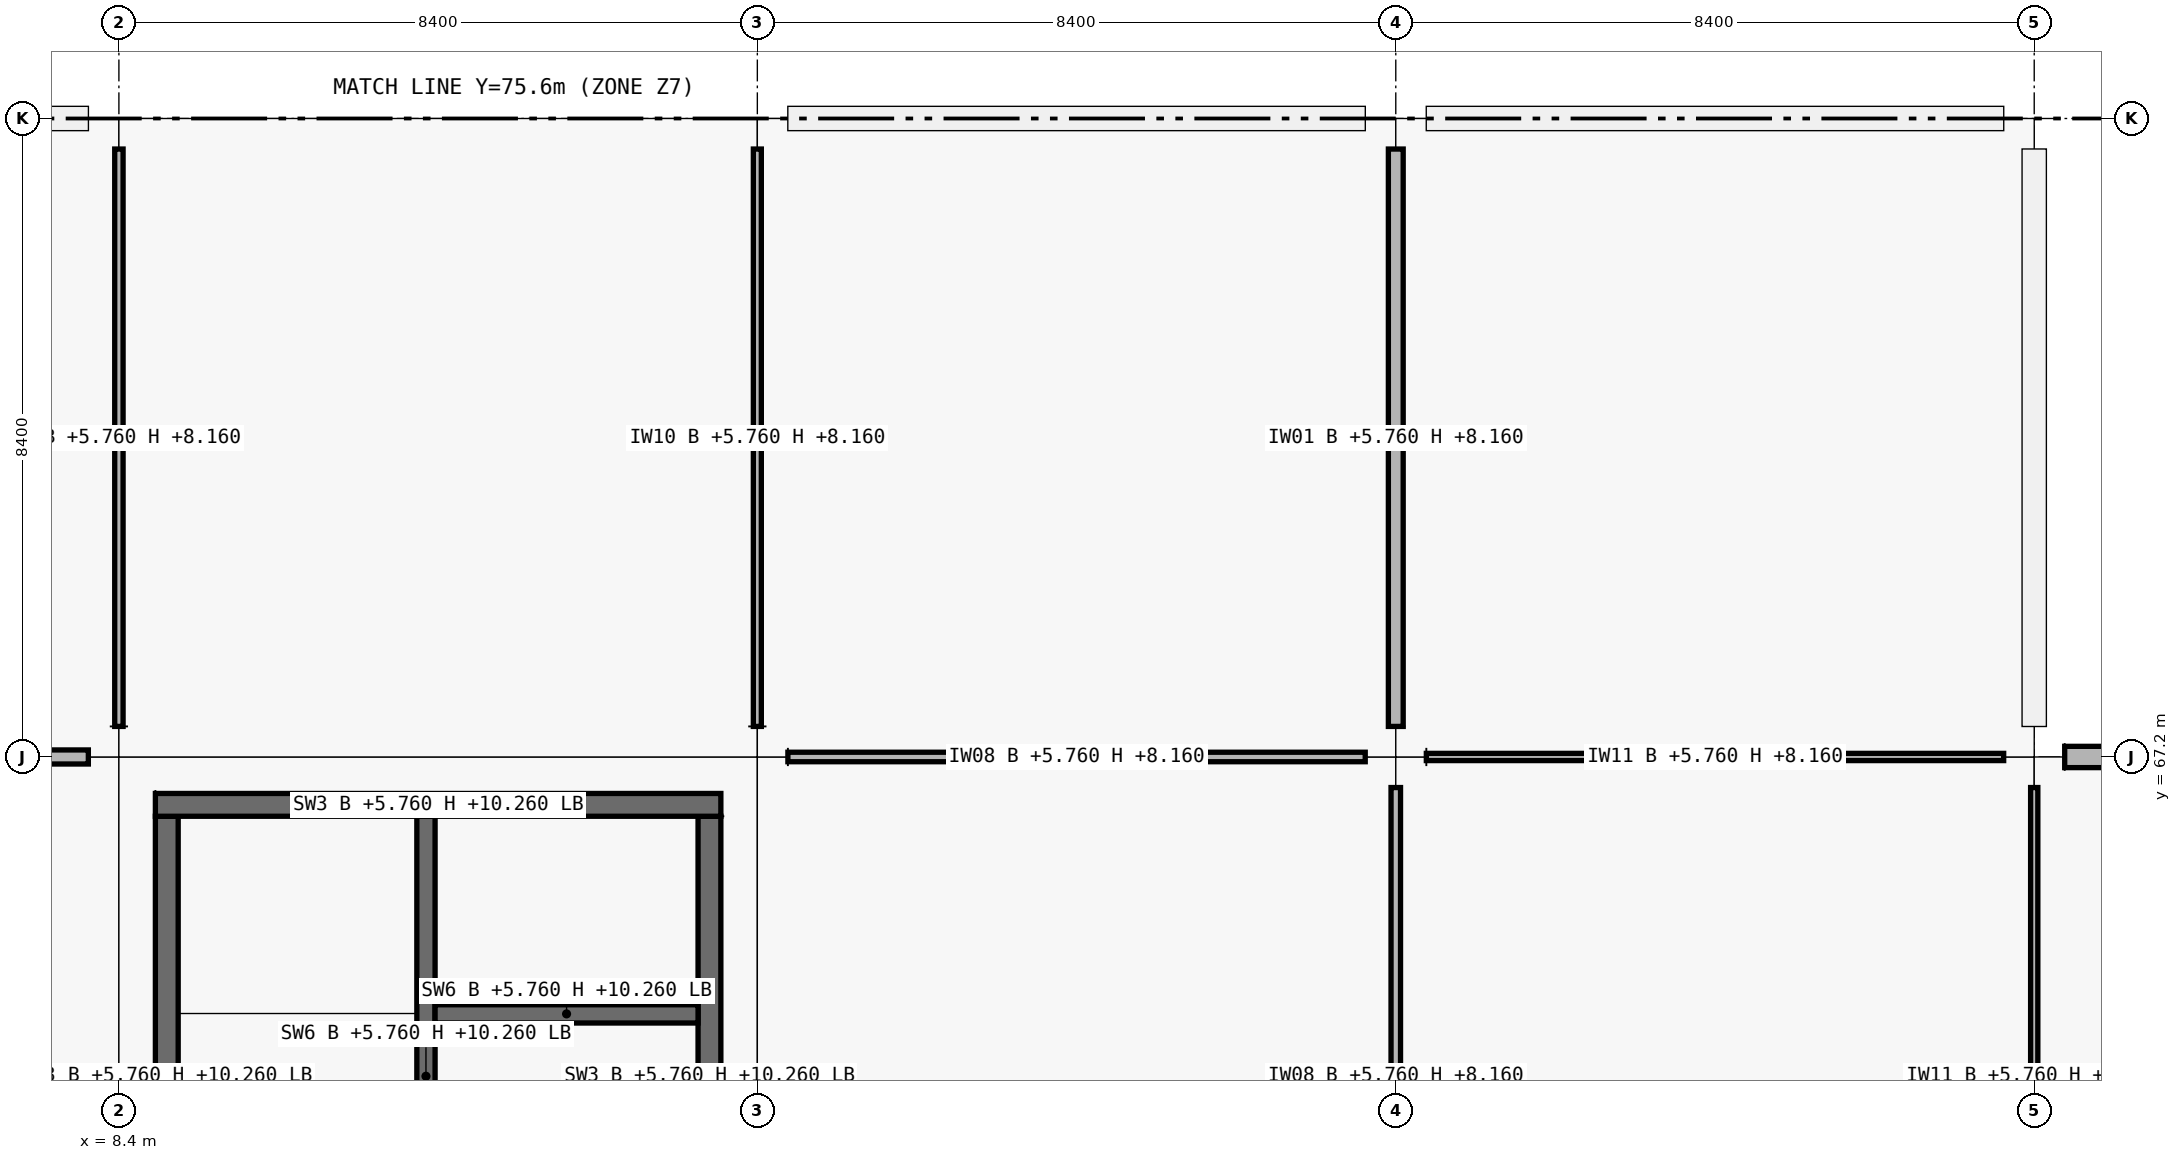
"""IFC4 building model, lengths in metres.
Left out: names, types, materials, properties, quantities, classifications, styles, units other than length and angle.
Written with IfcOpenShell. Run it as: python <this file> out.ifc"""

import sys

from ifc_helpers import new_model, si_unit, direction, frame, frame_2d, origin, origin_2d, place, context, subcontext, project, spatial, rectangle, extrude, element, fill, save


model = new_model("IFC4")
c1 = context("Model", 3, precision=1e-05, world=origin(), true_north=direction((0.0, 1.0)))
c2 = subcontext(c1, "Body", "Model", "MODEL_VIEW")
j1 = project(units=[si_unit("LENGTHUNIT", "METRE"), si_unit("PLANEANGLEUNIT", "RADIAN")], contexts=[c1])
p1 = place(None, origin())
s1 = spatial("IfcSite", under=j1, at=p1, CompositionType="ELEMENT")
p2 = place(p1, origin())
s2 = spatial("IfcBuilding", under=s1, at=p2, CompositionType="ELEMENT")
p3 = place(p2, frame((0.0, 0.0, 5.76)))
s3 = spatial("IfcBuildingStorey", under=s2, at=p3, CompositionType="ELEMENT", Elevation=5.76)
for number, where, z_axis, x_axis in (
    (1, (8.4, 67.2, 0.0), (0.0, 0.0, 1.0), (1.0, 0.0, 0.0)),
    (2, (8.4, 75.6, 0.0), (0.0, 0.0, 1.0), (1.0, 0.0, 0.0)),
    (3, (16.8, 67.2, 0.0), (0.0, 0.0, 1.0), (1.0, 0.0, 0.0)),
    (4, (16.8, 75.6, 0.0), (0.0, 0.0, 1.0), (1.0, 0.0, 0.0)),
    (5, (25.2, 67.2, 0.0), (0.0, 0.0, 1.0), (1.0, 0.0, 0.0)),
    (6, (25.2, 75.6, 0.0), (0.0, 0.0, 1.0), (1.0, 0.0, 0.0)),
    (7, (33.6, 67.2, 0.0), (0.0, 0.0, 1.0), (1.0, 0.0, 0.0)),
    (8, (33.6, 75.6, 0.0), (0.0, 0.0, 1.0), (1.0, 0.0, 0.0)),
):
    element("IfcColumn", number, at=place(p3, frame(where, z_axis=z_axis, x_axis=x_axis)), inside=s3, PredefinedType="COLUMN", context=c2, shape_type="SweptSolid", body=[
        extrude(rectangle(XDim=0.8, YDim=0.8, at=origin_2d()), origin(), (0.0, 0.0, 1.0), 4.5),
    ])
p4 = place(p3, frame((0.276, 75.6, 0.0), z_axis=(0.0, 0.0, 1.0), x_axis=(1.0, 0.0, 0.0)))
e9 = element("IfcWall", 9, at=p4, inside=s3, PredefinedType="SOLIDWALL", context=c2, shape_type="SweptSolid", body=[
    extrude(rectangle(XDim=7.723, YDim=0.32, at=frame_2d((3.862, 0.0))), origin(), (0.0, 0.0, 1.0), 3.4),
])
p5 = place(p4, frame((2.861, 0.0, 0.9)))
e10 = element("IfcOpeningElement", 10, at=p5, cuts=e9, PredefinedType="OPENING", context=c2, shape_type="SweptSolid", body=[
    extrude(rectangle(XDim=2.0, YDim=2.25, at=frame_2d((1.0, 1.125))), frame((0.0, 0.16, 0.0), z_axis=(0.0, -1.0, 0.0), x_axis=(1.0, 0.0, 0.0)), (0.0, 0.0, 1.0), 0.32),
])
p6 = place(p3, frame((17.201, 75.6, 0.0), z_axis=(0.0, 0.0, 1.0), x_axis=(1.0, 0.0, 0.0)))
e11 = element("IfcWall", 11, at=p6, inside=s3, PredefinedType="SOLIDWALL", context=c2, shape_type="SweptSolid", body=[
    extrude(rectangle(XDim=7.598, YDim=0.32, at=frame_2d((3.799, 0.0))), origin(), (0.0, 0.0, 1.0), 3.4),
])
p7 = place(p6, frame((3.049, 0.0, 0.9)))
e12 = element("IfcOpeningElement", 12, at=p7, cuts=e11, PredefinedType="OPENING", context=c2, shape_type="SweptSolid", body=[
    extrude(rectangle(XDim=1.5, YDim=1.2, at=frame_2d((0.75, 0.6))), frame((0.0, 0.16, 0.0), z_axis=(0.0, -1.0, 0.0), x_axis=(1.0, 0.0, 0.0)), (0.0, 0.0, 1.0), 0.32),
])
p8 = place(p3, frame((25.601, 75.6, 0.0), z_axis=(0.0, 0.0, 1.0), x_axis=(1.0, 0.0, 0.0)))
e13 = element("IfcWall", 13, at=p8, inside=s3, PredefinedType="SOLIDWALL", context=c2, shape_type="SweptSolid", body=[
    extrude(rectangle(XDim=7.598, YDim=0.32, at=frame_2d((3.799, 0.0))), origin(), (0.0, 0.0, 1.0), 3.4),
])
p9 = place(p8, frame((2.724, 0.0, 0.9)))
e14 = element("IfcOpeningElement", 14, at=p9, cuts=e13, PredefinedType="OPENING", context=c2, shape_type="SweptSolid", body=[
    extrude(rectangle(XDim=2.15, YDim=1.95, at=frame_2d((1.075, 0.975))), frame((0.0, 0.16, 0.0), z_axis=(0.0, -1.0, 0.0), x_axis=(1.0, 0.0, 0.0)), (0.0, 0.0, 1.0), 0.32),
])
p10 = place(p3, frame((33.6, 75.199, 0.0), z_axis=(0.0, 0.0, 1.0), x_axis=(0.0, -1.0, 0.0)))
e15 = element("IfcWall", 15, at=p10, inside=s3, PredefinedType="SOLIDWALL", context=c2, shape_type="SweptSolid", body=[
    extrude(rectangle(XDim=7.598, YDim=0.32, at=frame_2d((3.799, 0.0))), origin(), (0.0, 0.0, 1.0), 3.4),
])
p11 = place(p10, frame((2.524, 0.0, 0.9)))
e16 = element("IfcOpeningElement", 16, at=p11, cuts=e15, PredefinedType="OPENING", context=c2, shape_type="SweptSolid", body=[
    extrude(rectangle(XDim=2.55, YDim=1.95, at=frame_2d((1.275, 0.975))), frame((0.0, 0.16, 0.0), z_axis=(0.0, -1.0, 0.0), x_axis=(1.0, 0.0, 0.0)), (0.0, 0.0, 1.0), 0.32),
])
p12 = place(p3, frame((34.001, 67.2, 0.0), z_axis=(0.0, 0.0, 1.0), x_axis=(1.0, 0.0, 0.0)))
e17 = element("IfcWall", 17, at=p12, inside=s3, PredefinedType="SOLIDWALL", context=c2, shape_type="SweptSolid", body=[
    extrude(rectangle(XDim=7.598, YDim=0.28, at=frame_2d((3.799, 0.0))), origin(), (0.0, 0.0, 1.0), 3.4),
])
p13 = place(p12, frame((3.149, 0.0, 0.9)))
e18 = element("IfcOpeningElement", 18, at=p13, cuts=e17, PredefinedType="OPENING", context=c2, shape_type="SweptSolid", body=[
    extrude(rectangle(XDim=1.3, YDim=1.95, at=frame_2d((0.65, 0.975))), frame((0.0, 0.14, 0.0), z_axis=(0.0, -1.0, 0.0), x_axis=(1.0, 0.0, 0.0)), (0.0, 0.0, 1.0), 0.28),
])
p14 = place(p3, frame((9.03, 59.58, 0.0), z_axis=(0.0, 0.0, 1.0), x_axis=(0.0, 1.0, 0.0)))
e19 = element("IfcWall", 19, at=p14, inside=s3, PredefinedType="SHEAR", context=c2, shape_type="SweptSolid", body=[
    extrude(rectangle(XDim=6.84, YDim=0.3, at=frame_2d((3.42, 0.0))), origin(), (0.0, 0.0, 1.0), 4.5),
])
p15 = place(p3, frame((8.88, 66.57, 0.0), z_axis=(0.0, 0.0, 1.0), x_axis=(1.0, 0.0, 0.0)))
e20 = element("IfcWall", 20, at=p15, inside=s3, PredefinedType="SHEAR", context=c2, shape_type="SweptSolid", body=[
    extrude(rectangle(XDim=7.44, YDim=0.3, at=frame_2d((3.72, 0.0))), origin(), (0.0, 0.0, 1.0), 4.5),
])
p16 = place(p3, frame((16.17, 66.42, 0.0), z_axis=(0.0, 0.0, 1.0), x_axis=(0.0, -1.0, 0.0)))
e21 = element("IfcWall", 21, at=p16, inside=s3, PredefinedType="SHEAR", context=c2, shape_type="SweptSolid", body=[
    extrude(rectangle(XDim=6.84, YDim=0.3, at=frame_2d((3.42, 0.0))), origin(), (0.0, 0.0, 1.0), 4.5),
])
p17 = place(p3, frame((12.44, 59.58, 0.0), z_axis=(0.0, 0.0, 1.0), x_axis=(0.0, 1.0, 0.0)))
e22 = element("IfcWall", 22, at=p17, inside=s3, PredefinedType="SHEAR", context=c2, shape_type="SweptSolid", body=[
    extrude(rectangle(XDim=6.84, YDim=0.24, at=frame_2d((3.42, 0.0))), origin(), (0.0, 0.0, 1.0), 4.5),
])
p18 = place(p17, frame((0.12, 0.0, 0.0)))
e23 = element("IfcOpeningElement", 23, at=p18, cuts=e22, PredefinedType="OPENING", context=c2, shape_type="SweptSolid", body=[
    extrude(rectangle(XDim=1.0, YDim=2.15, at=frame_2d((0.5, 1.075))), frame((0.0, 0.12, 0.0), z_axis=(0.0, -1.0, 0.0), x_axis=(1.0, 0.0, 0.0)), (0.0, 0.0, 1.0), 0.24),
])
p19 = place(p3, frame((12.56, 63.82, 0.0), z_axis=(0.0, 0.0, 1.0), x_axis=(1.0, 0.0, 0.0)))
e24 = element("IfcWall", 24, at=p19, inside=s3, PredefinedType="SHEAR", context=c2, shape_type="SweptSolid", body=[
    extrude(rectangle(XDim=3.46, YDim=0.24, at=frame_2d((1.73, 0.0))), origin(), (0.0, 0.0, 1.0), 4.5),
])
p20 = place(p19, frame((1.18, 0.0, 0.0)))
e25 = element("IfcOpeningElement", 25, at=p20, cuts=e24, PredefinedType="OPENING", context=c2, shape_type="SweptSolid", body=[
    extrude(rectangle(XDim=1.1, YDim=2.15, at=frame_2d((0.55, 1.075))), frame((0.0, 0.12, 0.0), z_axis=(0.0, -1.0, 0.0), x_axis=(1.0, 0.0, 0.0)), (0.0, 0.0, 1.0), 0.24),
])
p21 = place(p3, frame((0.277, 67.2, 0.0), z_axis=(0.0, 0.0, 1.0), x_axis=(1.0, 0.0, 0.0)))
e26 = element("IfcWall", 26, at=p21, inside=s3, PredefinedType="PARTITIONING", context=c2, shape_type="SweptSolid", body=[
    extrude(rectangle(XDim=7.721, YDim=0.185, at=frame_2d((3.86, 0.0))), origin(), (0.0, 0.0, 1.0), 2.4),
])
p22 = place(p21, frame((3.37, 0.0, 0.0)))
e27 = element("IfcOpeningElement", 27, at=p22, cuts=e26, PredefinedType="OPENING", context=c2, shape_type="SweptSolid", body=[
    extrude(rectangle(XDim=0.98, YDim=2.18, at=frame_2d((0.49, 1.09))), frame((0.0, 0.093, 0.0), z_axis=(0.0, -1.0, 0.0), x_axis=(1.0, 0.0, 0.0)), (0.0, 0.0, 1.0), 0.185),
])
p23 = place(p3, frame((17.202, 67.2, 0.0), z_axis=(0.0, 0.0, 1.0), x_axis=(1.0, 0.0, 0.0)))
e28 = element("IfcWall", 28, at=p23, inside=s3, PredefinedType="PARTITIONING", context=c2, shape_type="SweptSolid", body=[
    extrude(rectangle(XDim=7.596, YDim=0.125, at=frame_2d((3.798, 0.0))), origin(), (0.0, 0.0, 1.0), 2.4),
])
p24 = place(p23, frame((3.273, 0.0, 0.0)))
e29 = element("IfcOpeningElement", 29, at=p24, cuts=e28, PredefinedType="OPENING", context=c2, shape_type="SweptSolid", body=[
    extrude(rectangle(XDim=1.05, YDim=2.12, at=frame_2d((0.525, 1.06))), frame((0.0, 0.062, 0.0), z_axis=(0.0, -1.0, 0.0), x_axis=(1.0, 0.0, 0.0)), (0.0, 0.0, 1.0), 0.125),
])
p25 = place(p3, frame((25.602, 67.2, 0.0), z_axis=(0.0, 0.0, 1.0), x_axis=(1.0, 0.0, 0.0)))
e30 = element("IfcWall", 30, at=p25, inside=s3, PredefinedType="PARTITIONING", context=c2, shape_type="SweptSolid", body=[
    extrude(rectangle(XDim=7.596, YDim=0.095, at=frame_2d((3.798, 0.0))), origin(), (0.0, 0.0, 1.0), 2.4),
])
p26 = place(p25, frame((3.258, 0.0, 0.0)))
e31 = element("IfcOpeningElement", 31, at=p26, cuts=e30, PredefinedType="OPENING", context=c2, shape_type="SweptSolid", body=[
    extrude(rectangle(XDim=1.08, YDim=2.22, at=frame_2d((0.54, 1.11))), frame((0.0, 0.047, 0.0), z_axis=(0.0, -1.0, 0.0), x_axis=(1.0, 0.0, 0.0)), (0.0, 0.0, 1.0), 0.095),
])
p27 = place(p3, frame((8.4, 67.602, 0.0), z_axis=(0.0, 0.0, 1.0), x_axis=(0.0, 1.0, 0.0)))
e32 = element("IfcWall", 32, at=p27, inside=s3, PredefinedType="MOVABLE", context=c2, shape_type="SweptSolid", body=[
    extrude(rectangle(XDim=7.596, YDim=0.11, at=frame_2d((3.798, 0.0))), origin(), (0.0, 0.0, 1.0), 2.4),
])
p28 = place(p27, frame((3.318, 0.0, 0.0)))
e33 = element("IfcOpeningElement", 33, at=p28, cuts=e32, PredefinedType="OPENING", context=c2, shape_type="SweptSolid", body=[
    extrude(rectangle(XDim=0.96, YDim=2.18, at=frame_2d((0.48, 1.09))), frame((0.0, 0.055, 0.0), z_axis=(0.0, -1.0, 0.0), x_axis=(1.0, 0.0, 0.0)), (0.0, 0.0, 1.0), 0.11),
])
p29 = place(p3, frame((16.8, 67.602, 0.0), z_axis=(0.0, 0.0, 1.0), x_axis=(0.0, 1.0, 0.0)))
e34 = element("IfcWall", 34, at=p29, inside=s3, PredefinedType="PARTITIONING", context=c2, shape_type="SweptSolid", body=[
    extrude(rectangle(XDim=7.596, YDim=0.105, at=frame_2d((3.798, 0.0))), origin(), (0.0, 0.0, 1.0), 2.4),
])
p30 = place(p29, frame((3.313, 0.0, 0.0)))
e35 = element("IfcOpeningElement", 35, at=p30, cuts=e34, PredefinedType="OPENING", context=c2, shape_type="SweptSolid", body=[
    extrude(rectangle(XDim=0.97, YDim=2.12, at=frame_2d((0.485, 1.06))), frame((0.0, 0.052, 0.0), z_axis=(0.0, -1.0, 0.0), x_axis=(1.0, 0.0, 0.0)), (0.0, 0.0, 1.0), 0.105),
])
p31 = place(p3, frame((25.2, 59.202, 0.0), z_axis=(0.0, 0.0, 1.0), x_axis=(0.0, 1.0, 0.0)))
e36 = element("IfcWall", 36, at=p31, inside=s3, PredefinedType="PARTITIONING", context=c2, shape_type="SweptSolid", body=[
    extrude(rectangle(XDim=7.596, YDim=0.125, at=frame_2d((3.798, 0.0))), origin(), (0.0, 0.0, 1.0), 2.4),
])
p32 = place(p31, frame((3.298, 0.0, 0.0)))
e37 = element("IfcOpeningElement", 37, at=p32, cuts=e36, PredefinedType="OPENING", context=c2, shape_type="SweptSolid", body=[
    extrude(rectangle(XDim=1.0, YDim=2.2, at=frame_2d((0.5, 1.1))), frame((0.0, 0.062, 0.0), z_axis=(0.0, -1.0, 0.0), x_axis=(1.0, 0.0, 0.0)), (0.0, 0.0, 1.0), 0.125),
])
p33 = place(p3, frame((25.2, 67.602, 0.0), z_axis=(0.0, 0.0, 1.0), x_axis=(0.0, 1.0, 0.0)))
e38 = element("IfcWall", 38, at=p33, inside=s3, PredefinedType="PARTITIONING", context=c2, shape_type="SweptSolid", body=[
    extrude(rectangle(XDim=7.596, YDim=0.195, at=frame_2d((3.798, 0.0))), origin(), (0.0, 0.0, 1.0), 2.4),
])
p34 = place(p33, frame((3.288, 0.0, 0.0)))
e39 = element("IfcOpeningElement", 39, at=p34, cuts=e38, PredefinedType="OPENING", context=c2, shape_type="SweptSolid", body=[
    extrude(rectangle(XDim=1.02, YDim=2.2, at=frame_2d((0.51, 1.1))), frame((0.0, 0.098, 0.0), z_axis=(0.0, -1.0, 0.0), x_axis=(1.0, 0.0, 0.0)), (0.0, 0.0, 1.0), 0.195),
])
p35 = place(p3, frame((33.6, 59.202, 0.0), z_axis=(0.0, 0.0, 1.0), x_axis=(0.0, 1.0, 0.0)))
e40 = element("IfcWall", 40, at=p35, inside=s3, PredefinedType="PARTITIONING", context=c2, shape_type="SweptSolid", body=[
    extrude(rectangle(XDim=7.596, YDim=0.095, at=frame_2d((3.798, 0.0))), origin(), (0.0, 0.0, 1.0), 2.4),
])
p36 = place(p35, frame((3.308, 0.0, 0.0)))
e41 = element("IfcOpeningElement", 41, at=p36, cuts=e40, PredefinedType="OPENING", context=c2, shape_type="SweptSolid", body=[
    extrude(rectangle(XDim=0.98, YDim=2.18, at=frame_2d((0.49, 1.09))), frame((0.0, 0.047, 0.0), z_axis=(0.0, -1.0, 0.0), x_axis=(1.0, 0.0, 0.0)), (0.0, 0.0, 1.0), 0.095),
])
p37 = place(p7, origin())
e42 = element("IfcWindow", 42, at=p37, inside=s3, PartitioningType="SINGLE_PANEL", PredefinedType="WINDOW", context=c2, shape_type="SweptSolid", body=[
    extrude(rectangle(XDim=1.5, YDim=1.2, at=frame_2d((0.75, 0.6))), frame((0.0, 0.03, 0.0), z_axis=(0.0, -1.0, 0.0), x_axis=(1.0, 0.0, 0.0)), (0.0, 0.0, 1.0), 0.06),
])
fill(e12, e42)
p38 = place(p9, origin())
e43 = element("IfcWindow", 43, at=p38, inside=s3, PartitioningType="SINGLE_PANEL", PredefinedType="WINDOW", context=c2, shape_type="SweptSolid", body=[
    extrude(rectangle(XDim=2.15, YDim=1.95, at=frame_2d((1.075, 0.975))), frame((0.0, 0.03, 0.0), z_axis=(0.0, -1.0, 0.0), x_axis=(1.0, 0.0, 0.0)), (0.0, 0.0, 1.0), 0.06),
])
fill(e14, e43)
p39 = place(p11, origin())
e44 = element("IfcWindow", 44, at=p39, inside=s3, PartitioningType="SINGLE_PANEL", PredefinedType="WINDOW", context=c2, shape_type="SweptSolid", body=[
    extrude(rectangle(XDim=2.55, YDim=1.95, at=frame_2d((1.275, 0.975))), frame((0.0, 0.03, 0.0), z_axis=(0.0, -1.0, 0.0), x_axis=(1.0, 0.0, 0.0)), (0.0, 0.0, 1.0), 0.06),
])
fill(e16, e44)
p40 = place(p20, origin())
e45 = element("IfcDoor", 45, at=p40, inside=s3, OperationType="DOUBLE_DOOR_SLIDING", PredefinedType="DOOR", context=c2, shape_type="SweptSolid", body=[
    extrude(rectangle(XDim=1.1, YDim=2.15, at=frame_2d((0.55, 1.075))), frame((0.0, 0.025, 0.0), z_axis=(0.0, -1.0, 0.0), x_axis=(1.0, 0.0, 0.0)), (0.0, 0.0, 1.0), 0.05),
])
fill(e25, e45)
p41 = place(p24, origin())
e46 = element("IfcDoor", 46, at=p41, inside=s3, OperationType="SINGLE_SWING_LEFT", PredefinedType="DOOR", context=c2, shape_type="SweptSolid", body=[
    extrude(rectangle(XDim=1.05, YDim=2.12, at=frame_2d((0.525, 1.06))), frame((0.0, 0.025, 0.0), z_axis=(0.0, -1.0, 0.0), x_axis=(1.0, 0.0, 0.0)), (0.0, 0.0, 1.0), 0.05),
])
fill(e29, e46)
p42 = place(p32, origin())
e47 = element("IfcDoor", 47, at=p42, inside=s3, OperationType="SINGLE_SWING_RIGHT", PredefinedType="DOOR", context=c2, shape_type="SweptSolid", body=[
    extrude(rectangle(XDim=1.0, YDim=2.2, at=frame_2d((0.5, 1.1))), frame((0.0, 0.025, 0.0), z_axis=(0.0, -1.0, 0.0), x_axis=(1.0, 0.0, 0.0)), (0.0, 0.0, 1.0), 0.05),
])
fill(e37, e47)
p43 = place(p26, origin())
e48 = element("IfcDoor", 48, at=p43, inside=s3, OperationType="SINGLE_SWING_RIGHT", PredefinedType="DOOR", context=c2, shape_type="SweptSolid", body=[
    extrude(rectangle(XDim=1.08, YDim=2.22, at=frame_2d((0.54, 1.11))), frame((0.0, 0.025, 0.0), z_axis=(0.0, -1.0, 0.0), x_axis=(1.0, 0.0, 0.0)), (0.0, 0.0, 1.0), 0.05),
])
fill(e31, e48)
p44 = place(p28, origin())
e49 = element("IfcDoor", 49, at=p44, inside=s3, OperationType="SINGLE_SWING_LEFT", PredefinedType="DOOR", context=c2, shape_type="SweptSolid", body=[
    extrude(rectangle(XDim=0.96, YDim=2.18, at=frame_2d((0.48, 1.09))), frame((0.0, 0.025, 0.0), z_axis=(0.0, -1.0, 0.0), x_axis=(1.0, 0.0, 0.0)), (0.0, 0.0, 1.0), 0.05),
])
fill(e33, e49)
p45 = place(p30, origin())
e50 = element("IfcDoor", 50, at=p45, inside=s3, OperationType="SINGLE_SWING_RIGHT", PredefinedType="DOOR", context=c2, shape_type="SweptSolid", body=[
    extrude(rectangle(XDim=0.97, YDim=2.12, at=frame_2d((0.485, 1.06))), frame((0.0, 0.025, 0.0), z_axis=(0.0, -1.0, 0.0), x_axis=(1.0, 0.0, 0.0)), (0.0, 0.0, 1.0), 0.05),
])
fill(e35, e50)
p46 = place(p34, origin())
e51 = element("IfcDoor", 51, at=p46, inside=s3, OperationType="SINGLE_SWING_LEFT", PredefinedType="DOOR", context=c2, shape_type="SweptSolid", body=[
    extrude(rectangle(XDim=1.02, YDim=2.2, at=frame_2d((0.51, 1.1))), frame((0.0, 0.025, 0.0), z_axis=(0.0, -1.0, 0.0), x_axis=(1.0, 0.0, 0.0)), (0.0, 0.0, 1.0), 0.05),
])
fill(e39, e51)
p47 = place(p36, origin())
e52 = element("IfcDoor", 52, at=p47, inside=s3, OperationType="SINGLE_SWING_LEFT", PredefinedType="DOOR", context=c2, shape_type="SweptSolid", body=[
    extrude(rectangle(XDim=0.98, YDim=2.18, at=frame_2d((0.49, 1.09))), frame((0.0, 0.025, 0.0), z_axis=(0.0, -1.0, 0.0), x_axis=(1.0, 0.0, 0.0)), (0.0, 0.0, 1.0), 0.05),
])
fill(e41, e52)
save(model, sys.argv[1])
